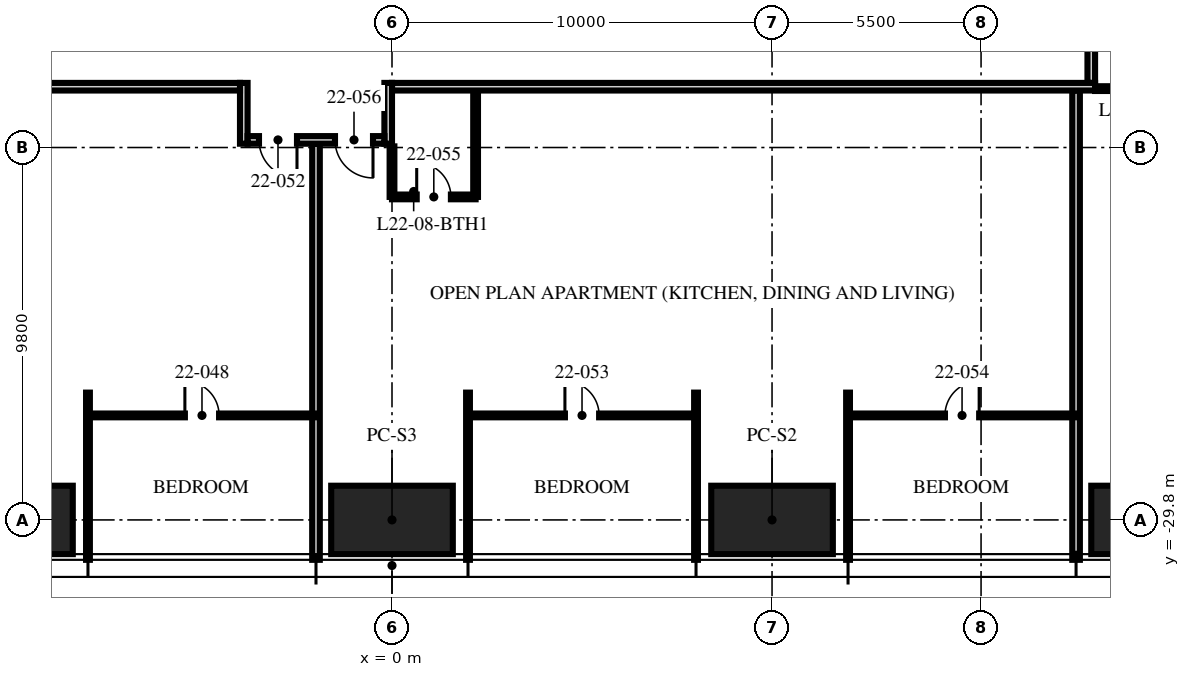
"""IFC4 building model, lengths in metres.
Left out: names, types, materials, properties, quantities, classifications, styles, units other than length and angle.
Written with IfcOpenShell. Run it as: python <this file> out.ifc"""

import sys

from ifc_helpers import new_model, si_unit, direction, frame, frame_2d, origin, origin_2d, place, context, subcontext, project, spatial, rectangle, hollow_rectangle, extrude, element, fill, save


model = new_model("IFC4")
c1 = context("Model", 3, precision=1e-05, world=origin(), true_north=direction((0.0, 1.0)))
c2 = subcontext(c1, "Body", "Model", "MODEL_VIEW")
j1 = project(units=[si_unit("LENGTHUNIT", "METRE"), si_unit("PLANEANGLEUNIT", "RADIAN")], contexts=[c1])
p1 = place(None, origin())
s1 = spatial("IfcSite", under=j1, at=p1, CompositionType="ELEMENT")
p2 = place(p1, origin())
s2 = spatial("IfcBuilding", under=s1, at=p2, CompositionType="ELEMENT")
p3 = place(p2, frame((0.0, 0.0, 88.5)))
s3 = spatial("IfcBuildingStorey", under=s2, at=p3, CompositionType="ELEMENT", Elevation=88.5)
for number, where, z_axis, x_axis in (
    (1, (20.0, -29.8, 0.0), (0.0, 0.0, 1.0), (1.0, 0.0, 0.0)),
    (2, (10.0, -29.8, 0.0), (0.0, 0.0, 1.0), (1.0, 0.0, 0.0)),
    (3, (0.0, -29.8, 0.0), (0.0, 0.0, 1.0), (1.0, 0.0, 0.0)),
    (4, (-10.0, -29.8, 0.0), (0.0, 0.0, 1.0), (1.0, 0.0, 0.0)),
):
    element("IfcColumn", number, at=place(p3, frame(where, z_axis=z_axis, x_axis=x_axis)), inside=s3, PredefinedType="COLUMN", context=c2, shape_type="SweptSolid", body=[
        extrude(hollow_rectangle(XDim=3.2, YDim=1.8, WallThickness=0.2, at=origin_2d()), origin(), (0.0, 0.0, 1.0), 3.75),
    ])
p4 = place(p3, frame((-8.0, -26.45, 0.0), z_axis=(0.0, 0.0, 1.0), x_axis=(0.0, -1.0, 0.0)))
e5 = element("IfcWall", 5, at=p4, inside=s3, PredefinedType="PARTITIONING", context=c2, shape_type="SweptSolid", body=[
    extrude(rectangle(XDim=4.4, YDim=0.1, at=frame_2d((2.2, 0.0))), origin(), (0.0, 0.0, 1.0), 2.71),
])
p5 = place(p3, frame((-2.0, -19.9, 0.0), z_axis=(0.0, 0.0, 1.0), x_axis=(0.0, -1.0, 0.0)))
e6 = element("IfcWall", 6, at=p5, inside=s3, PredefinedType="PARTITIONING", context=c2, shape_type="SweptSolid", body=[
    extrude(rectangle(XDim=10.95, YDim=0.2, at=frame_2d((5.475, 0.0))), origin(), (0.0, 0.0, 1.0), 2.71),
])
for number, where, z_axis, x_axis in (
    (7, (2.0, -26.45, 0.0), (0.0, 0.0, 1.0), (0.0, -1.0, 0.0)),
    (8, (8.0, -26.45, 0.0), (0.0, 0.0, 1.0), (0.0, -1.0, 0.0)),
    (9, (12.0, -26.45, 0.0), (0.0, 0.0, 1.0), (0.0, -1.0, 0.0)),
):
    element("IfcWall", number, at=place(p3, frame(where, z_axis=z_axis, x_axis=x_axis)), inside=s3, PredefinedType="PARTITIONING", context=c2, shape_type="SweptSolid", body=[
        extrude(rectangle(XDim=4.4, YDim=0.1, at=frame_2d((2.2, 0.0))), origin(), (0.0, 0.0, 1.0), 2.71),
    ])
p6 = place(p3, frame((18.0, -18.5, 0.0), z_axis=(0.0, 0.0, 1.0), x_axis=(0.0, -1.0, 0.0)))
e10 = element("IfcWall", 10, at=p6, inside=s3, PredefinedType="PARTITIONING", context=c2, shape_type="SweptSolid", body=[
    extrude(rectangle(XDim=12.35, YDim=0.2, at=frame_2d((6.175, 0.0))), origin(), (0.0, 0.0, 1.0), 2.3),
])
p7 = place(p3, frame((-8.0, -27.05, 0.0), z_axis=(0.0, 0.0, 1.0), x_axis=(1.0, 0.0, 0.0)))
e11 = element("IfcWall", 11, at=p7, inside=s3, PredefinedType="PARTITIONING", context=c2, shape_type="SweptSolid", body=[
    extrude(rectangle(XDim=6.0, YDim=0.1, at=frame_2d((3.0, 0.0))), origin(), (0.0, 0.0, 1.0), 2.61),
])
p8 = place(p7, frame((2.55, 0.0, 0.0)))
e12 = element("IfcOpeningElement", 12, at=p8, cuts=e11, PredefinedType="OPENING", context=c2, shape_type="SweptSolid", body=[
    extrude(rectangle(XDim=0.9, YDim=2.1, at=frame_2d((0.45, 1.05))), frame((0.0, 0.06, 0.0), z_axis=(0.0, -1.0, 0.0), x_axis=(1.0, 0.0, 0.0)), (0.0, 0.0, 1.0), 0.12),
])
p9 = place(p3, frame((2.0, -27.05, 0.0), z_axis=(0.0, 0.0, 1.0), x_axis=(1.0, 0.0, 0.0)))
e13 = element("IfcWall", 13, at=p9, inside=s3, PredefinedType="PARTITIONING", context=c2, shape_type="SweptSolid", body=[
    extrude(rectangle(XDim=6.0, YDim=0.1, at=frame_2d((3.0, 0.0))), origin(), (0.0, 0.0, 1.0), 2.61),
])
p10 = place(p9, frame((2.55, 0.0, 0.0)))
e14 = element("IfcOpeningElement", 14, at=p10, cuts=e13, PredefinedType="OPENING", context=c2, shape_type="SweptSolid", body=[
    extrude(rectangle(XDim=0.9, YDim=2.1, at=frame_2d((0.45, 1.05))), frame((0.0, 0.06, 0.0), z_axis=(0.0, -1.0, 0.0), x_axis=(1.0, 0.0, 0.0)), (0.0, 0.0, 1.0), 0.12),
])
p11 = place(p3, frame((12.0, -27.05, 0.0), z_axis=(0.0, 0.0, 1.0), x_axis=(1.0, 0.0, 0.0)))
e15 = element("IfcWall", 15, at=p11, inside=s3, PredefinedType="PARTITIONING", context=c2, shape_type="SweptSolid", body=[
    extrude(rectangle(XDim=6.0, YDim=0.1, at=frame_2d((3.0, 0.0))), origin(), (0.0, 0.0, 1.0), 2.61),
])
p12 = place(p11, frame((2.55, 0.0, 0.0)))
e16 = element("IfcOpeningElement", 16, at=p12, cuts=e15, PredefinedType="OPENING", context=c2, shape_type="SweptSolid", body=[
    extrude(rectangle(XDim=0.9, YDim=2.1, at=frame_2d((0.45, 1.05))), frame((0.0, 0.06, 0.0), z_axis=(0.0, -1.0, 0.0), x_axis=(1.0, 0.0, 0.0)), (0.0, 0.0, 1.0), 0.12),
])
p13 = place(p3, frame((0.0, -21.3, 0.0), z_axis=(0.0, 0.0, 1.0), x_axis=(1.0, 0.0, 0.0)))
e17 = element("IfcWall", 17, at=p13, inside=s3, PredefinedType="PARTITIONING", context=c2, shape_type="SweptSolid", body=[
    extrude(rectangle(XDim=2.2, YDim=0.125, at=frame_2d((1.1, 0.0))), origin(), (0.0, 0.0, 1.0), 2.492),
])
p14 = place(p13, frame((0.65, 0.0, 0.0)))
e18 = element("IfcOpeningElement", 18, at=p14, cuts=e17, PredefinedType="OPENING", context=c2, shape_type="SweptSolid", body=[
    extrude(rectangle(XDim=0.9, YDim=2.1, at=frame_2d((0.45, 1.05))), frame((0.0, 0.073, 0.0), z_axis=(0.0, -1.0, 0.0), x_axis=(1.0, 0.0, 0.0)), (0.0, 0.0, 1.0), 0.145),
])
p15 = place(p3, frame((0.0, -19.97, 0.0), z_axis=(0.0, 0.0, 1.0), x_axis=(0.0, -1.0, 0.0)))
e19 = element("IfcWall", 19, at=p15, inside=s3, PredefinedType="PARTITIONING", context=c2, shape_type="SweptSolid", body=[
    extrude(rectangle(XDim=1.33, YDim=0.125, at=frame_2d((0.665, 0.0))), origin(), (0.0, 0.0, 1.0), 2.492),
])
p16 = place(p3, frame((2.2, -18.5, 0.0), z_axis=(0.0, 0.0, 1.0), x_axis=(0.0, -1.0, 0.0)))
e20 = element("IfcWall", 20, at=p16, inside=s3, PredefinedType="PARTITIONING", context=c2, shape_type="SweptSolid", body=[
    extrude(rectangle(XDim=2.8, YDim=0.125, at=frame_2d((1.4, 0.0))), origin(), (0.0, 0.0, 1.0), 3.5),
])
p17 = place(p3, frame((18.5, -18.45, 0.0), z_axis=(0.0, 0.0, 1.0), x_axis=(1.0, 0.0, 0.0)))
e21 = element("IfcWall", 21, at=p17, inside=s3, PredefinedType="PARTITIONING", context=c2, shape_type="SweptSolid", body=[
    extrude(rectangle(XDim=2.8, YDim=0.125, at=frame_2d((1.4, 0.0))), origin(), (0.0, 0.0, 1.0), 2.3),
])
p18 = place(p3, frame((18.4, -18.3, 0.0), z_axis=(0.0, 0.0, 1.0), x_axis=(0.0, 1.0, 0.0)))
e22 = element("IfcWall", 22, at=p18, inside=s3, PredefinedType="PARTITIONING", context=c2, shape_type="SweptSolid", body=[
    extrude(rectangle(XDim=8.3, YDim=0.2, at=frame_2d((4.15, 0.0))), origin(), (0.0, 0.0, 1.0), 2.3),
])
p19 = place(p3, frame((18.5, -18.4, 0.0), z_axis=(0.0, 0.0, 1.0), x_axis=(-1.0, 0.0, 0.0)))
e23 = element("IfcWall", 23, at=p19, inside=s3, PredefinedType="PARTITIONING", context=c2, shape_type="SweptSolid", body=[
    extrude(rectangle(XDim=18.5, YDim=0.2, at=frame_2d((9.25, 0.0))), origin(), (0.0, 0.0, 1.0), 2.3),
])
p20 = place(p3, frame((-0.1, -18.3, 0.0), z_axis=(0.0, 0.0, 1.0), x_axis=(0.0, -1.0, 0.0)))
e24 = element("IfcWall", 24, at=p20, inside=s3, PredefinedType="PARTITIONING", context=c2, shape_type="SweptSolid", body=[
    extrude(rectangle(XDim=1.6, YDim=0.2, at=frame_2d((0.8, 0.0))), origin(), (0.0, 0.0, 1.0), 2.492),
])
p21 = place(p3, frame((-3.9, -18.3, 0.0), z_axis=(0.0, 0.0, 1.0), x_axis=(0.0, -1.0, 0.0)))
e25 = element("IfcWall", 25, at=p21, inside=s3, PredefinedType="PARTITIONING", context=c2, shape_type="SweptSolid", body=[
    extrude(rectangle(XDim=1.6, YDim=0.2, at=frame_2d((0.8, 0.0))), origin(), (0.0, 0.0, 1.0), 3.5),
])
p22 = place(p3, frame((-0.2, -19.8, 0.0), z_axis=(0.0, 0.0, 1.0), x_axis=(-1.0, 0.0, 0.0)))
e26 = element("IfcWall", 26, at=p22, inside=s3, PredefinedType="PARTITIONING", context=c2, shape_type="SweptSolid", body=[
    extrude(rectangle(XDim=3.6, YDim=0.2, at=frame_2d((1.8, 0.0))), origin(), (0.0, 0.0, 1.0), 3.5),
])
p23 = place(p22, frame((2.3, 0.0, 0.0)))
e27 = element("IfcOpeningElement", 27, at=p23, cuts=e26, PredefinedType="OPENING", context=c2, shape_type="SweptSolid", body=[
    extrude(rectangle(XDim=1.0, YDim=2.2, at=frame_2d((0.5, 1.1))), frame((0.0, 0.11, 0.0), z_axis=(0.0, -1.0, 0.0), x_axis=(1.0, 0.0, 0.0)), (0.0, 0.0, 1.0), 0.22),
])
p24 = place(p22, frame((0.3, 0.0, 0.0)))
e28 = element("IfcOpeningElement", 28, at=p24, cuts=e26, PredefinedType="OPENING", context=c2, shape_type="SweptSolid", body=[
    extrude(rectangle(XDim=1.0, YDim=2.2, at=frame_2d((0.5, 1.1))), frame((0.0, 0.11, 0.0), z_axis=(0.0, -1.0, 0.0), x_axis=(1.0, 0.0, 0.0)), (0.0, 0.0, 1.0), 0.22),
])
p25 = place(p3, frame((-4.0, -18.4, 0.0), z_axis=(0.0, 0.0, 1.0), x_axis=(-1.0, 0.0, 0.0)))
e29 = element("IfcWall", 29, at=p25, inside=s3, PredefinedType="PARTITIONING", context=c2, shape_type="SweptSolid", body=[
    extrude(rectangle(XDim=14.5, YDim=0.2, at=frame_2d((7.25, 0.0))), origin(), (0.0, 0.0, 1.0), 2.3),
])
p26 = place(p8, origin())
e30 = element("IfcDoor", 30, at=p26, inside=s3, OperationType="SINGLE_SWING_LEFT", PredefinedType="DOOR", context=c2, shape_type="SweptSolid", body=[
    extrude(rectangle(XDim=0.9, YDim=2.1, at=frame_2d((0.45, 1.05))), frame((0.0, 0.025, 0.0), z_axis=(0.0, -1.0, 0.0), x_axis=(1.0, 0.0, 0.0)), (0.0, 0.0, 1.0), 0.05),
])
fill(e12, e30)
p27 = place(p23, origin())
e31 = element("IfcDoor", 31, at=p27, inside=s3, OperationType="SINGLE_SWING_LEFT", PredefinedType="DOOR", context=c2, shape_type="SweptSolid", body=[
    extrude(rectangle(XDim=1.0, YDim=2.2, at=frame_2d((0.5, 1.1))), frame((0.0, 0.025, 0.0), z_axis=(0.0, -1.0, 0.0), x_axis=(1.0, 0.0, 0.0)), (0.0, 0.0, 1.0), 0.05),
])
fill(e27, e31)
p28 = place(p10, origin())
e32 = element("IfcDoor", 32, at=p28, inside=s3, OperationType="SINGLE_SWING_LEFT", PredefinedType="DOOR", context=c2, shape_type="SweptSolid", body=[
    extrude(rectangle(XDim=0.9, YDim=2.1, at=frame_2d((0.45, 1.05))), frame((0.0, 0.025, 0.0), z_axis=(0.0, -1.0, 0.0), x_axis=(1.0, 0.0, 0.0)), (0.0, 0.0, 1.0), 0.05),
])
fill(e14, e32)
p29 = place(p12, origin())
e33 = element("IfcDoor", 33, at=p29, inside=s3, OperationType="SINGLE_SWING_RIGHT", PredefinedType="DOOR", context=c2, shape_type="SweptSolid", body=[
    extrude(rectangle(XDim=0.9, YDim=2.1, at=frame_2d((0.45, 1.05))), frame((0.0, 0.025, 0.0), z_axis=(0.0, -1.0, 0.0), x_axis=(1.0, 0.0, 0.0)), (0.0, 0.0, 1.0), 0.05),
])
fill(e16, e33)
p30 = place(p14, origin())
e34 = element("IfcDoor", 34, at=p30, inside=s3, OperationType="SINGLE_SWING_LEFT", PredefinedType="DOOR", context=c2, shape_type="SweptSolid", body=[
    extrude(rectangle(XDim=0.9, YDim=2.1, at=frame_2d((0.45, 1.05))), frame((0.0, 0.025, 0.0), z_axis=(0.0, -1.0, 0.0), x_axis=(1.0, 0.0, 0.0)), (0.0, 0.0, 1.0), 0.05),
])
fill(e18, e34)
p31 = place(p24, origin())
e35 = element("IfcDoor", 35, at=p31, inside=s3, OperationType="SINGLE_SWING_LEFT", PredefinedType="DOOR", context=c2, shape_type="SweptSolid", body=[
    extrude(rectangle(XDim=1.0, YDim=2.2, at=frame_2d((0.5, 1.1))), frame((0.0, 0.025, 0.0), z_axis=(0.0, -1.0, 0.0), x_axis=(1.0, 0.0, 0.0)), (0.0, 0.0, 1.0), 0.05),
])
fill(e28, e35)
save(model, sys.argv[1])
